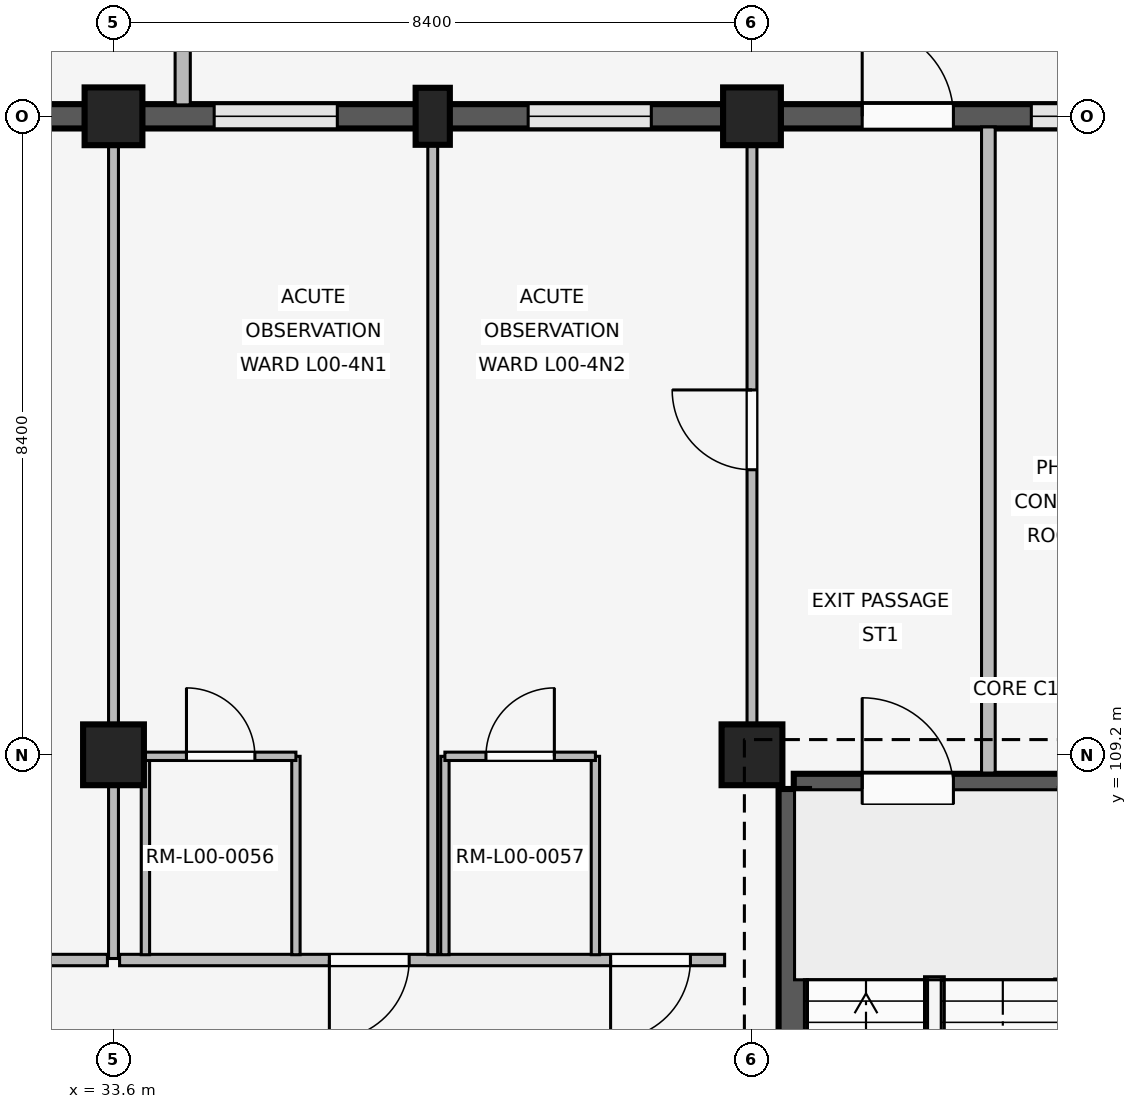
"""IFC4 building model, lengths in metres.
Left out: names, types, materials, properties, quantities, classifications, styles, units other than length and angle.
Written with IfcOpenShell. Run it as: python <this file> out.ifc"""

import sys

from ifc_helpers import new_model, si_unit, direction, frame, frame_2d, origin, origin_2d, place, context, subcontext, project, spatial, rectangle, extrude, element, fill, save


model = new_model("IFC4")
c1 = context("Model", 3, precision=1e-05, world=origin(), true_north=direction((0.0, 1.0)))
c2 = subcontext(c1, "Body", "Model", "MODEL_VIEW")
j1 = project(units=[si_unit("LENGTHUNIT", "METRE"), si_unit("PLANEANGLEUNIT", "RADIAN")], contexts=[c1])
p1 = place(None, origin())
s1 = spatial("IfcSite", under=j1, at=p1, CompositionType="ELEMENT")
p2 = place(p1, origin())
s2 = spatial("IfcBuilding", under=s1, at=p2, CompositionType="ELEMENT")
p3 = place(p2, origin())
s3 = spatial("IfcBuildingStorey", under=s2, at=p3, CompositionType="ELEMENT", Elevation=0.0)
p4 = place(p3, frame((33.6, 109.2, 0.0), z_axis=(0.0, 0.0, 1.0), x_axis=(1.0, 0.0, 0.0)))
e1 = element("IfcColumn", 1, at=p4, inside=s3, PredefinedType="COLUMN", context=c2, shape_type="SweptSolid", body=[
    extrude(rectangle(XDim=0.8, YDim=0.8, at=origin_2d()), origin(), (0.0, 0.0, 1.0), 4.8),
])
p5 = place(p3, frame((33.6, 117.6, 0.0), z_axis=(0.0, 0.0, 1.0), x_axis=(1.0, 0.0, 0.0)))
e2 = element("IfcColumn", 2, at=p5, inside=s3, PredefinedType="COLUMN", context=c2, shape_type="SweptSolid", body=[
    extrude(rectangle(XDim=0.76, YDim=0.76, at=origin_2d()), origin(), (0.0, 0.0, 1.0), 4.8),
])
p6 = place(p3, frame((42.0, 109.2, 0.0), z_axis=(0.0, 0.0, 1.0), x_axis=(1.0, 0.0, 0.0)))
e3 = element("IfcColumn", 3, at=p6, inside=s3, PredefinedType="COLUMN", context=c2, shape_type="SweptSolid", body=[
    extrude(rectangle(XDim=0.8, YDim=0.8, at=origin_2d()), origin(), (0.0, 0.0, 1.0), 4.8),
])
p7 = place(p3, frame((42.0, 117.6, 0.0), z_axis=(0.0, 0.0, 1.0), x_axis=(1.0, 0.0, 0.0)))
e4 = element("IfcColumn", 4, at=p7, inside=s3, PredefinedType="COLUMN", context=c2, shape_type="SweptSolid", body=[
    extrude(rectangle(XDim=0.76, YDim=0.76, at=origin_2d()), origin(), (0.0, 0.0, 1.0), 4.8),
])
p8 = place(p3, frame((37.8, 117.6, 0.0), z_axis=(0.0, 0.0, 1.0), x_axis=(1.0, 0.0, 0.0)))
e5 = element("IfcColumn", 5, at=p8, inside=s3, PredefinedType="PILASTER", context=c2, shape_type="SweptSolid", body=[
    extrude(rectangle(XDim=0.45, YDim=0.75, at=origin_2d()), origin(), (0.0, 0.0, 1.0), 4.8),
])
p9 = place(p3, frame((25.575, 117.6, 0.0), z_axis=(0.0, 0.0, 1.0), x_axis=(1.0, 0.0, 0.0)))
e6 = element("IfcWall", 6, at=p9, inside=s3, PredefinedType="SOLIDWALL", context=c2, shape_type="SweptSolid", body=[
    extrude(rectangle(XDim=7.65, YDim=0.32, at=frame_2d((3.825, 0.0))), origin(), (0.0, 0.0, 1.0), 3.82),
])
p10 = place(p9, frame((2.825, 0.0, 0.0)))
e7 = element("IfcOpeningElement", 7, at=p10, cuts=e6, PredefinedType="OPENING", context=c2, shape_type="SweptSolid", body=[
    extrude(rectangle(XDim=2.0, YDim=2.4, at=frame_2d((1.0, 1.2))), frame((0.0, 0.17, 0.0), z_axis=(0.0, -1.0, 0.0), x_axis=(1.0, 0.0, 0.0)), (0.0, 0.0, 1.0), 0.34),
])
p11 = place(p3, frame((33.975, 117.6, 0.0), z_axis=(0.0, 0.0, 1.0), x_axis=(1.0, 0.0, 0.0)))
e8 = element("IfcWall", 8, at=p11, inside=s3, PredefinedType="SOLIDWALL", context=c2, shape_type="SweptSolid", body=[
    extrude(rectangle(XDim=7.65, YDim=0.32, at=frame_2d((3.825, 0.0))), origin(), (0.0, 0.0, 1.0), 3.82),
])
p12 = place(p11, frame((0.949, 0.0, 0.85)))
e9 = element("IfcOpeningElement", 9, at=p12, cuts=e8, PredefinedType="OPENING", context=c2, shape_type="SweptSolid", body=[
    extrude(rectangle(XDim=1.62, YDim=1.8, at=frame_2d((0.81, 0.9))), frame((0.0, 0.17, 0.0), z_axis=(0.0, -1.0, 0.0), x_axis=(1.0, 0.0, 0.0)), (0.0, 0.0, 1.0), 0.34),
])
p13 = place(p11, frame((5.081, 0.0, 0.85)))
e10 = element("IfcOpeningElement", 10, at=p13, cuts=e8, PredefinedType="OPENING", context=c2, shape_type="SweptSolid", body=[
    extrude(rectangle(XDim=1.62, YDim=1.8, at=frame_2d((0.81, 0.9))), frame((0.0, 0.17, 0.0), z_axis=(0.0, -1.0, 0.0), x_axis=(1.0, 0.0, 0.0)), (0.0, 0.0, 1.0), 0.34),
])
p14 = place(p3, frame((34.51, 117.75, 0.0), z_axis=(0.0, 0.0, 1.0), x_axis=(0.0, 1.0, 0.0)))
e11 = element("IfcWall", 11, at=p14, inside=s3, PredefinedType="ELEMENTEDWALL", context=c2, shape_type="SweptSolid", body=[
    extrude(rectangle(XDim=0.85, YDim=0.2, at=frame_2d((0.425, 0.0))), origin(), (0.0, 0.0, 1.0), 3.8),
])
p15 = place(p3, frame((42.375, 117.6, 0.0), z_axis=(0.0, 0.0, 1.0), x_axis=(1.0, 0.0, 0.0)))
e12 = element("IfcWall", 12, at=p15, inside=s3, PredefinedType="SOLIDWALL", context=c2, shape_type="SweptSolid", body=[
    extrude(rectangle(XDim=7.65, YDim=0.32, at=frame_2d((3.825, 0.0))), origin(), (0.0, 0.0, 1.0), 3.82),
])
p16 = place(p15, frame((1.075, 0.0, 0.0)))
e13 = element("IfcOpeningElement", 13, at=p16, cuts=e12, PredefinedType="OPENING", context=c2, shape_type="SweptSolid", body=[
    extrude(rectangle(XDim=1.2, YDim=2.25, at=frame_2d((0.6, 1.125))), frame((0.0, 0.17, 0.0), z_axis=(0.0, -1.0, 0.0), x_axis=(1.0, 0.0, 0.0)), (0.0, 0.0, 1.0), 0.34),
])
p17 = place(p15, frame((3.3, 0.0, 0.85)))
e14 = element("IfcOpeningElement", 14, at=p17, cuts=e12, PredefinedType="OPENING", context=c2, shape_type="SweptSolid", body=[
    extrude(rectangle(XDim=1.44, YDim=1.62, at=frame_2d((0.72, 0.81))), frame((0.0, 0.17, 0.0), z_axis=(0.0, -1.0, 0.0), x_axis=(1.0, 0.0, 0.0)), (0.0, 0.0, 1.0), 0.34),
])
p18 = place(p15, frame((5.45, 0.0, 0.85)))
e15 = element("IfcOpeningElement", 15, at=p18, cuts=e12, PredefinedType="OPENING", context=c2, shape_type="SweptSolid", body=[
    extrude(rectangle(XDim=1.44, YDim=1.62, at=frame_2d((0.72, 0.81))), frame((0.0, 0.17, 0.0), z_axis=(0.0, -1.0, 0.0), x_axis=(1.0, 0.0, 0.0)), (0.0, 0.0, 1.0), 0.34),
])
p19 = place(p3, frame((42.55, 108.75, 0.0), z_axis=(0.0, 0.0, 1.0), x_axis=(1.0, 0.0, 0.0)))
e16 = element("IfcWall", 16, at=p19, inside=s3, PredefinedType="SHEAR", context=c2, shape_type="SweptSolid", body=[
    extrude(rectangle(XDim=7.5, YDim=0.4, at=frame_2d((3.75, 0.0))), origin(), (0.0, 0.0, 1.0), 4.52),
])
p20 = place(p19, frame((0.9, 0.0, 0.0)))
e17 = element("IfcOpeningElement", 17, at=p20, cuts=e16, PredefinedType="OPENING", context=c2, shape_type="SweptSolid", body=[
    extrude(rectangle(XDim=1.2, YDim=2.1, at=frame_2d((0.6, 1.05))), frame((0.0, 0.21, 0.0), z_axis=(0.0, -1.0, 0.0), x_axis=(1.0, 0.0, 0.0)), (0.0, 0.0, 1.0), 0.42),
])
p21 = place(p3, frame((42.55, 101.2, 0.0), z_axis=(0.0, 0.0, 1.0), x_axis=(0.0, 1.0, 0.0)))
e18 = element("IfcWall", 18, at=p21, inside=s3, PredefinedType="SHEAR", context=c2, shape_type="SweptSolid", body=[
    extrude(rectangle(XDim=7.55, YDim=0.4, at=frame_2d((3.775, 0.0))), origin(), (0.0, 0.0, 1.0), 4.52),
])
p22 = place(p21, frame((0.28, 0.0, 0.0)))
e19 = element("IfcOpeningElement", 19, at=p22, cuts=e18, PredefinedType="OPENING", context=c2, shape_type="SweptSolid", body=[
    extrude(rectangle(XDim=1.0, YDim=2.15, at=frame_2d((0.5, 1.075))), frame((0.0, 0.21, 0.0), z_axis=(0.0, -1.0, 0.0), x_axis=(1.0, 0.0, 0.0)), (0.0, 0.0, 1.0), 0.42),
])
p23 = place(p3, frame((33.52, 106.5, 0.0), z_axis=(0.0, 0.0, 1.0), x_axis=(-1.0, 0.0, 0.0)))
e20 = element("IfcWall", 20, at=p23, inside=s3, PredefinedType="PARTITIONING", context=c2, shape_type="SweptSolid", body=[
    extrude(rectangle(XDim=7.96, YDim=0.15, at=frame_2d((3.98, 0.0))), origin(), (0.0, 0.0, 1.0), 3.8),
])
p24 = place(p23, frame((3.405, 0.0, 0.0)))
e21 = element("IfcOpeningElement", 21, at=p24, cuts=e20, PredefinedType="OPENING", context=c2, shape_type="SweptSolid", body=[
    extrude(rectangle(XDim=1.15, YDim=2.2, at=frame_2d((0.575, 1.1))), frame((0.0, 0.085, 0.0), z_axis=(0.0, -1.0, 0.0), x_axis=(1.0, 0.0, 0.0)), (0.0, 0.0, 1.0), 0.17),
])
p25 = place(p3, frame((33.6, 106.52, 0.0), z_axis=(0.0, 0.0, 1.0), x_axis=(0.0, 1.0, 0.0)))
e22 = element("IfcWall", 22, at=p25, inside=s3, PredefinedType="PARTITIONING", context=c2, shape_type="SweptSolid", body=[
    extrude(rectangle(XDim=10.94, YDim=0.13, at=frame_2d((5.47, 0.0))), origin(), (0.0, 0.0, 1.0), 3.8),
])
p26 = place(p3, frame((41.64, 106.5, 0.0), z_axis=(0.0, 0.0, 1.0), x_axis=(-1.0, 0.0, 0.0)))
e23 = element("IfcWall", 23, at=p26, inside=s3, PredefinedType="PARTITIONING", context=c2, shape_type="SweptSolid", body=[
    extrude(rectangle(XDim=7.96, YDim=0.15, at=frame_2d((3.98, 0.0))), origin(), (0.0, 0.0, 1.0), 3.8),
])
p27 = place(p26, frame((0.45, 0.0, 0.0)))
e24 = element("IfcOpeningElement", 24, at=p27, cuts=e23, PredefinedType="OPENING", context=c2, shape_type="SweptSolid", body=[
    extrude(rectangle(XDim=1.05, YDim=2.2, at=frame_2d((0.525, 1.1))), frame((0.0, 0.085, 0.0), z_axis=(0.0, -1.0, 0.0), x_axis=(1.0, 0.0, 0.0)), (0.0, 0.0, 1.0), 0.17),
])
p28 = place(p26, frame((4.15, 0.0, 0.0)))
e25 = element("IfcOpeningElement", 25, at=p28, cuts=e23, PredefinedType="OPENING", context=c2, shape_type="SweptSolid", body=[
    extrude(rectangle(XDim=1.05, YDim=2.2, at=frame_2d((0.525, 1.1))), frame((0.0, 0.085, 0.0), z_axis=(0.0, -1.0, 0.0), x_axis=(1.0, 0.0, 0.0)), (0.0, 0.0, 1.0), 0.17),
])
p29 = place(p3, frame((37.8, 106.57, 0.0), z_axis=(0.0, 0.0, 1.0), x_axis=(0.0, 1.0, 0.0)))
e26 = element("IfcWall", 26, at=p29, inside=s3, PredefinedType="PARTITIONING", context=c2, shape_type="SweptSolid", body=[
    extrude(rectangle(XDim=10.93, YDim=0.13, at=frame_2d((5.465, 0.0))), origin(), (0.0, 0.0, 1.0), 3.8),
])
for number, where, z_axis, x_axis in (
    (27, (34.02, 106.57, 0.0), (0.0, 0.0, 1.0), (0.0, 1.0, 0.0)),
    (28, (36.0, 106.57, 0.0), (0.0, 0.0, 1.0), (0.0, 1.0, 0.0)),
):
    element("IfcWall", number, at=place(p3, frame(where, z_axis=z_axis, x_axis=x_axis)), inside=s3, PredefinedType="PARTITIONING", context=c2, shape_type="SweptSolid", body=[
        extrude(rectangle(XDim=2.61, YDim=0.11, at=frame_2d((1.305, 0.0))), origin(), (0.0, 0.0, 1.0), 3.8),
    ])
p30 = place(p3, frame((34.02, 109.18, 0.0), z_axis=(0.0, 0.0, 1.0), x_axis=(1.0, 0.0, 0.0)))
e29 = element("IfcWall", 29, at=p30, inside=s3, PredefinedType="PARTITIONING", context=c2, shape_type="SweptSolid", body=[
    extrude(rectangle(XDim=1.98, YDim=0.11, at=frame_2d((0.99, 0.0))), origin(), (0.0, 0.0, 1.0), 3.8),
])
p31 = place(p30, frame((0.54, 0.0, 0.0)))
e30 = element("IfcOpeningElement", 30, at=p31, cuts=e29, PredefinedType="OPENING", context=c2, shape_type="SweptSolid", body=[
    extrude(rectangle(XDim=0.9, YDim=2.1, at=frame_2d((0.45, 1.05))), frame((0.0, 0.065, 0.0), z_axis=(0.0, -1.0, 0.0), x_axis=(1.0, 0.0, 0.0)), (0.0, 0.0, 1.0), 0.13),
])
for number, where, z_axis, x_axis in (
    (31, (37.96, 106.57, 0.0), (0.0, 0.0, 1.0), (0.0, 1.0, 0.0)),
    (32, (39.94, 106.57, 0.0), (0.0, 0.0, 1.0), (0.0, 1.0, 0.0)),
):
    element("IfcWall", number, at=place(p3, frame(where, z_axis=z_axis, x_axis=x_axis)), inside=s3, PredefinedType="PARTITIONING", context=c2, shape_type="SweptSolid", body=[
        extrude(rectangle(XDim=2.61, YDim=0.11, at=frame_2d((1.305, 0.0))), origin(), (0.0, 0.0, 1.0), 3.8),
    ])
p32 = place(p3, frame((37.96, 109.18, 0.0), z_axis=(0.0, 0.0, 1.0), x_axis=(1.0, 0.0, 0.0)))
e33 = element("IfcWall", 33, at=p32, inside=s3, PredefinedType="PARTITIONING", context=c2, shape_type="SweptSolid", body=[
    extrude(rectangle(XDim=1.98, YDim=0.11, at=frame_2d((0.99, 0.0))), origin(), (0.0, 0.0, 1.0), 3.8),
])
p33 = place(p32, frame((0.54, 0.0, 0.0)))
e34 = element("IfcOpeningElement", 34, at=p33, cuts=e33, PredefinedType="OPENING", context=c2, shape_type="SweptSolid", body=[
    extrude(rectangle(XDim=0.9, YDim=2.1, at=frame_2d((0.45, 1.05))), frame((0.0, 0.065, 0.0), z_axis=(0.0, -1.0, 0.0), x_axis=(1.0, 0.0, 0.0)), (0.0, 0.0, 1.0), 0.13),
])
p34 = place(p3, frame((42.0, 109.55, 0.0), z_axis=(0.0, 0.0, 1.0), x_axis=(0.0, 1.0, 0.0)))
e35 = element("IfcWall", 35, at=p34, inside=s3, PredefinedType="PARTITIONING", context=c2, shape_type="SweptSolid", body=[
    extrude(rectangle(XDim=7.91, YDim=0.13, at=frame_2d((3.955, 0.0))), origin(), (0.0, 0.0, 1.0), 3.8),
])
p35 = place(p34, frame((3.4, 0.0, 0.0)))
e36 = element("IfcOpeningElement", 36, at=p35, cuts=e35, PredefinedType="OPENING", context=c2, shape_type="SweptSolid", body=[
    extrude(rectangle(XDim=1.05, YDim=2.2, at=frame_2d((0.525, 1.1))), frame((0.0, 0.075, 0.0), z_axis=(0.0, -1.0, 0.0), x_axis=(1.0, 0.0, 0.0)), (0.0, 0.0, 1.0), 0.15),
])
p36 = place(p3, frame((45.11, 108.96, 0.0), z_axis=(0.0, 0.0, 1.0), x_axis=(0.0, 1.0, 0.0)))
e37 = element("IfcWall", 37, at=p36, inside=s3, PredefinedType="PARTITIONING", context=c2, shape_type="SweptSolid", body=[
    extrude(rectangle(XDim=8.5, YDim=0.18, at=frame_2d((4.25, 0.0))), origin(), (0.0, 0.0, 1.0), 3.8),
])
p37 = place(p12, origin())
e38 = element("IfcWindow", 38, at=p37, inside=s3, PartitioningType="SINGLE_PANEL", PredefinedType="WINDOW", context=c2, shape_type="SweptSolid", body=[
    extrude(rectangle(XDim=1.62, YDim=1.8, at=frame_2d((0.81, 0.9))), frame((0.0, 0.03, 0.0), z_axis=(0.0, -1.0, 0.0), x_axis=(1.0, 0.0, 0.0)), (0.0, 0.0, 1.0), 0.06),
])
fill(e9, e38)
p38 = place(p13, origin())
e39 = element("IfcWindow", 39, at=p38, inside=s3, PartitioningType="SINGLE_PANEL", PredefinedType="WINDOW", context=c2, shape_type="SweptSolid", body=[
    extrude(rectangle(XDim=1.62, YDim=1.8, at=frame_2d((0.81, 0.9))), frame((0.0, 0.03, 0.0), z_axis=(0.0, -1.0, 0.0), x_axis=(1.0, 0.0, 0.0)), (0.0, 0.0, 1.0), 0.06),
])
fill(e10, e39)
p39 = place(p16, origin())
e40 = element("IfcDoor", 40, at=p39, inside=s3, OperationType="SINGLE_SWING_LEFT", PredefinedType="DOOR", context=c2, shape_type="SweptSolid", body=[
    extrude(rectangle(XDim=1.2, YDim=2.25, at=frame_2d((0.6, 1.125))), frame((0.0, 0.025, 0.0), z_axis=(0.0, -1.0, 0.0), x_axis=(1.0, 0.0, 0.0)), (0.0, 0.0, 1.0), 0.05),
])
fill(e13, e40)
p40 = place(p17, origin())
e41 = element("IfcWindow", 41, at=p40, inside=s3, PartitioningType="SINGLE_PANEL", PredefinedType="WINDOW", context=c2, shape_type="SweptSolid", body=[
    extrude(rectangle(XDim=1.44, YDim=1.62, at=frame_2d((0.72, 0.81))), frame((0.0, 0.03, 0.0), z_axis=(0.0, -1.0, 0.0), x_axis=(1.0, 0.0, 0.0)), (0.0, 0.0, 1.0), 0.06),
])
fill(e14, e41)
p41 = place(p20, origin())
e42 = element("IfcDoor", 42, at=p41, inside=s3, OperationType="SINGLE_SWING_LEFT", PredefinedType="DOOR", context=c2, shape_type="SweptSolid", body=[
    extrude(rectangle(XDim=1.2, YDim=2.1, at=frame_2d((0.6, 1.05))), frame((0.0, 0.025, 0.0), z_axis=(0.0, -1.0, 0.0), x_axis=(1.0, 0.0, 0.0)), (0.0, 0.0, 1.0), 0.05),
])
fill(e17, e42)
p42 = place(p27, origin())
e43 = element("IfcDoor", 43, at=p42, inside=s3, OperationType="SINGLE_SWING_RIGHT", PredefinedType="DOOR", context=c2, shape_type="SweptSolid", body=[
    extrude(rectangle(XDim=1.05, YDim=2.2, at=frame_2d((0.525, 1.1))), frame((0.0, 0.025, 0.0), z_axis=(0.0, -1.0, 0.0), x_axis=(1.0, 0.0, 0.0)), (0.0, 0.0, 1.0), 0.05),
])
fill(e24, e43)
p43 = place(p28, origin())
e44 = element("IfcDoor", 44, at=p43, inside=s3, OperationType="SINGLE_SWING_RIGHT", PredefinedType="DOOR", context=c2, shape_type="SweptSolid", body=[
    extrude(rectangle(XDim=1.05, YDim=2.2, at=frame_2d((0.525, 1.1))), frame((0.0, 0.025, 0.0), z_axis=(0.0, -1.0, 0.0), x_axis=(1.0, 0.0, 0.0)), (0.0, 0.0, 1.0), 0.05),
])
fill(e25, e44)
p44 = place(p31, origin())
e45 = element("IfcDoor", 45, at=p44, inside=s3, OperationType="SINGLE_SWING_LEFT", PredefinedType="DOOR", context=c2, shape_type="SweptSolid", body=[
    extrude(rectangle(XDim=0.9, YDim=2.1, at=frame_2d((0.45, 1.05))), frame((0.0, 0.025, 0.0), z_axis=(0.0, -1.0, 0.0), x_axis=(1.0, 0.0, 0.0)), (0.0, 0.0, 1.0), 0.05),
])
fill(e30, e45)
p45 = place(p33, origin())
e46 = element("IfcDoor", 46, at=p45, inside=s3, OperationType="SINGLE_SWING_RIGHT", PredefinedType="DOOR", context=c2, shape_type="SweptSolid", body=[
    extrude(rectangle(XDim=0.9, YDim=2.1, at=frame_2d((0.45, 1.05))), frame((0.0, 0.025, 0.0), z_axis=(0.0, -1.0, 0.0), x_axis=(1.0, 0.0, 0.0)), (0.0, 0.0, 1.0), 0.05),
])
fill(e34, e46)
p46 = place(p35, origin())
e47 = element("IfcDoor", 47, at=p46, inside=s3, OperationType="SINGLE_SWING_RIGHT", PredefinedType="DOOR", context=c2, shape_type="SweptSolid", body=[
    extrude(rectangle(XDim=1.05, YDim=2.2, at=frame_2d((0.525, 1.1))), frame((0.0, 0.025, 0.0), z_axis=(0.0, -1.0, 0.0), x_axis=(1.0, 0.0, 0.0)), (0.0, 0.0, 1.0), 0.05),
])
fill(e36, e47)
save(model, sys.argv[1])
